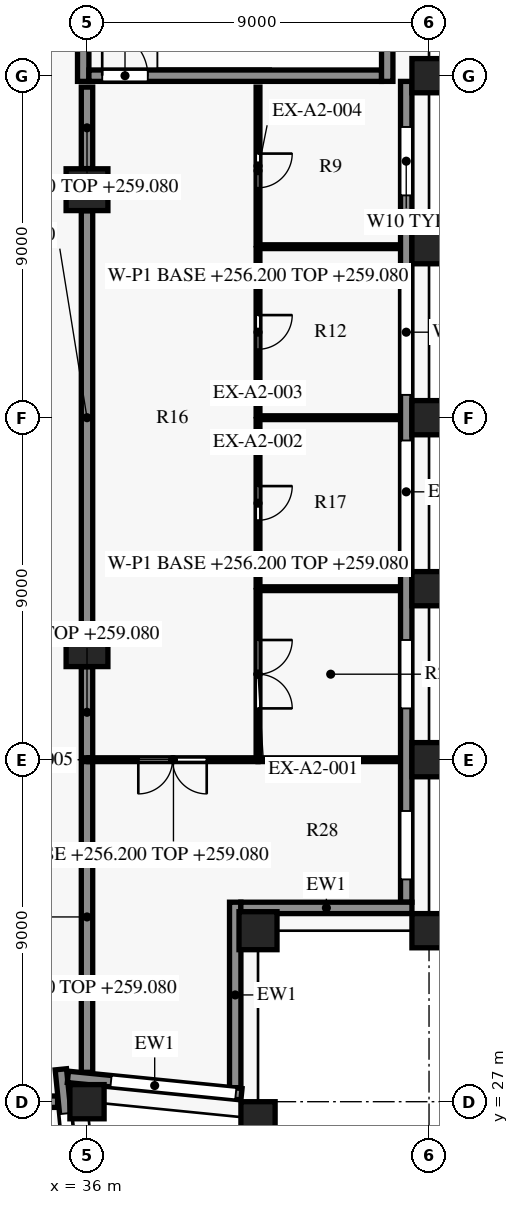
"""IFC4 building model, lengths in metres.
Left out: names, types, materials, properties, quantities, classifications, styles, units other than length and angle.
Written with IfcOpenShell. Run it as: python <this file> out.ifc"""

import sys

from ifc_helpers import new_model, si_unit, direction, frame, frame_2d, origin, origin_2d, place, context, subcontext, project, spatial, rectangle, extrude, element, fill, save


model = new_model("IFC4")
c1 = context("Model", 3, precision=1e-05, world=origin(), true_north=direction((0.0, 1.0)))
c2 = subcontext(c1, "Body", "Model", "MODEL_VIEW")
j1 = project(units=[si_unit("LENGTHUNIT", "METRE"), si_unit("PLANEANGLEUNIT", "RADIAN")], contexts=[c1])
p1 = place(None, origin())
s1 = spatial("IfcSite", under=j1, at=p1, CompositionType="ELEMENT")
p2 = place(p1, origin())
s2 = spatial("IfcBuilding", under=s1, at=p2, CompositionType="ELEMENT")
p3 = place(p2, frame((0.0, 0.0, 256.2)))
s3 = spatial("IfcBuildingStorey", under=s2, at=p3, CompositionType="ELEMENT", Elevation=256.2)
for number, where, z_axis, x_axis in (
    (1, (36.0, 27.0, 0.0), (0.0, 0.0, 1.0), (-0.1, 0.995, 0.0)),
    (2, (40.5, 26.55, 0.0), (0.0, 0.0, 1.0), (0.995, -0.1, 0.0)),
    (3, (45.0, 31.5, 0.0), (0.0, 0.0, 1.0), (0.0, 1.0, 0.0)),
    (4, (45.0, 36.0, 0.0), (0.0, 0.0, 1.0), (0.0, 1.0, 0.0)),
    (5, (45.0, 40.5, 0.0), (0.0, 0.0, 1.0), (0.0, 1.0, 0.0)),
    (6, (45.0, 45.0, 0.0), (0.0, 0.0, 1.0), (0.0, 1.0, 0.0)),
    (7, (45.0, 49.5, 0.0), (0.0, 0.0, 1.0), (0.0, 1.0, 0.0)),
    (8, (45.0, 54.0, 0.0), (0.0, 0.0, 1.0), (0.0, 1.0, 0.0)),
):
    element("IfcColumn", number, at=place(p3, frame(where, z_axis=z_axis, x_axis=x_axis)), inside=s3, PredefinedType="COLUMN", context=c2, shape_type="SweptSolid", body=[
        extrude(rectangle(XDim=0.9, YDim=0.9, at=origin_2d()), origin(), (0.0, 0.0, 1.0), 3.8),
    ])
p4 = place(p3, frame((40.5, 31.5, 0.0), z_axis=(0.0, 0.0, 1.0), x_axis=(1.0, 0.0, 0.0)))
e9 = element("IfcColumn", 9, at=p4, inside=s3, PredefinedType="COLUMN", context=c2, shape_type="SweptSolid", body=[
    extrude(rectangle(XDim=1.0, YDim=1.0, at=origin_2d()), origin(), (0.0, 0.0, 1.0), 3.8),
])
for number, where, z_axis, x_axis in (
    (10, (36.0, 39.0, 0.0), (0.0, 0.0, 1.0), (1.0, 0.0, 0.0)),
    (11, (36.0, 51.0, 0.0), (0.0, 0.0, 1.0), (1.0, 0.0, 0.0)),
):
    element("IfcColumn", number, at=place(p3, frame(where, z_axis=z_axis, x_axis=x_axis)), inside=s3, PredefinedType="COLUMN", context=c2, shape_type="SweptSolid", body=[
        extrude(rectangle(XDim=1.1, YDim=1.1, at=origin_2d()), origin(), (0.0, 0.0, 1.0), 3.8),
    ])
p5 = place(p3, frame((35.312, 27.852, 0.0), z_axis=(0.0, 0.0, 1.0), x_axis=(0.099503719021, -0.99503719021, 0.0)))
e12 = element("IfcWall", 12, at=p5, inside=s3, PredefinedType="SOLIDWALL", context=c2, shape_type="SweptSolid", body=[
    extrude(rectangle(XDim=4.62, YDim=0.3, at=frame_2d((2.31, 0.0))), origin(), (0.0, 0.0, 1.0), 3.15),
])
p6 = place(p5, frame((1.17, 0.0, 0.15)))
e13 = element("IfcOpeningElement", 13, at=p6, cuts=e12, PredefinedType="OPENING", context=c2, shape_type="SweptSolid", body=[
    extrude(rectangle(XDim=3.3, YDim=2.4, at=frame_2d((1.65, 1.2))), frame((0.0, 0.16, 0.0), z_axis=(0.0, -1.0, 0.0), x_axis=(1.0, 0.0, 0.0)), (0.0, 0.0, 1.0), 0.32),
])
p7 = place(p3, frame((40.065, 27.197, 0.0), z_axis=(0.0, 0.0, 1.0), x_axis=(-0.995036663613, 0.099508984853, 0.0)))
e14 = element("IfcWall", 14, at=p7, inside=s3, PredefinedType="SOLIDWALL", context=c2, shape_type="SweptSolid", body=[
    extrude(rectangle(XDim=4.59, YDim=0.3, at=frame_2d((2.295, 0.0))), origin(), (0.0, 0.0, 1.0), 3.15),
])
p8 = place(p7, frame((0.15, 0.0, 0.15)))
e15 = element("IfcOpeningElement", 15, at=p8, cuts=e14, PredefinedType="OPENING", context=c2, shape_type="SweptSolid", body=[
    extrude(rectangle(XDim=3.3, YDim=2.4, at=frame_2d((1.65, 1.2))), frame((0.0, 0.16, 0.0), z_axis=(0.0, -1.0, 0.0), x_axis=(1.0, 0.0, 0.0)), (0.0, 0.0, 1.0), 0.32),
])
p9 = place(p3, frame((39.9, 32.25, 0.0), z_axis=(0.0, 0.0, 1.0), x_axis=(0.0, -1.0, 0.0)))
e16 = element("IfcWall", 16, at=p9, inside=s3, PredefinedType="SOLIDWALL", context=c2, shape_type="SweptSolid", body=[
    extrude(rectangle(XDim=4.881, YDim=0.3, at=frame_2d((2.44, 0.0))), origin(), (0.0, 0.0, 1.0), 3.15),
])
p10 = place(p3, frame((44.55, 32.1, 0.0), z_axis=(0.0, 0.0, 1.0), x_axis=(-1.0, 0.0, 0.0)))
e17 = element("IfcWall", 17, at=p10, inside=s3, PredefinedType="SOLIDWALL", context=c2, shape_type="SweptSolid", body=[
    extrude(rectangle(XDim=4.502, YDim=0.3, at=frame_2d((2.251, 0.0))), origin(), (0.0, 0.0, 1.0), 3.15),
])
p11 = place(p3, frame((44.4, 53.85, 0.0), z_axis=(0.0, 0.0, 1.0), x_axis=(0.0, -1.0, 0.0)))
e18 = element("IfcWall", 18, at=p11, inside=s3, PredefinedType="SOLIDWALL", context=c2, shape_type="SweptSolid", body=[
    extrude(rectangle(XDim=21.602, YDim=0.3, at=frame_2d((10.801, 0.0))), origin(), (0.0, 0.0, 1.0), 3.15),
])
p12 = place(p11, frame((1.2, 0.0, 0.75)))
e19 = element("IfcOpeningElement", 19, at=p12, cuts=e18, PredefinedType="OPENING", context=c2, shape_type="SweptSolid", body=[
    extrude(rectangle(XDim=1.8, YDim=1.8, at=frame_2d((0.9, 0.9))), frame((0.0, 0.16, 0.0), z_axis=(0.0, -1.0, 0.0), x_axis=(1.0, 0.0, 0.0)), (0.0, 0.0, 1.0), 0.32),
])
p13 = place(p11, frame((4.95, 0.0, 0.15)))
e20 = element("IfcOpeningElement", 20, at=p13, cuts=e18, PredefinedType="OPENING", context=c2, shape_type="SweptSolid", body=[
    extrude(rectangle(XDim=3.3, YDim=2.4, at=frame_2d((1.65, 1.2))), frame((0.0, 0.16, 0.0), z_axis=(0.0, -1.0, 0.0), x_axis=(1.0, 0.0, 0.0)), (0.0, 0.0, 1.0), 0.32),
])
p14 = place(p11, frame((9.45, 0.0, 0.15)))
e21 = element("IfcOpeningElement", 21, at=p14, cuts=e18, PredefinedType="OPENING", context=c2, shape_type="SweptSolid", body=[
    extrude(rectangle(XDim=3.3, YDim=2.4, at=frame_2d((1.65, 1.2))), frame((0.0, 0.16, 0.0), z_axis=(0.0, -1.0, 0.0), x_axis=(1.0, 0.0, 0.0)), (0.0, 0.0, 1.0), 0.32),
])
p15 = place(p11, frame((14.7, 0.0, 0.75)))
e22 = element("IfcOpeningElement", 22, at=p15, cuts=e18, PredefinedType="OPENING", context=c2, shape_type="SweptSolid", body=[
    extrude(rectangle(XDim=1.8, YDim=1.8, at=frame_2d((0.9, 0.9))), frame((0.0, 0.16, 0.0), z_axis=(0.0, -1.0, 0.0), x_axis=(1.0, 0.0, 0.0)), (0.0, 0.0, 1.0), 0.32),
])
p16 = place(p11, frame((19.2, 0.0, 0.75)))
e23 = element("IfcOpeningElement", 23, at=p16, cuts=e18, PredefinedType="OPENING", context=c2, shape_type="SweptSolid", body=[
    extrude(rectangle(XDim=1.8, YDim=1.8, at=frame_2d((0.9, 0.9))), frame((0.0, 0.16, 0.0), z_axis=(0.0, -1.0, 0.0), x_axis=(1.0, 0.0, 0.0)), (0.0, 0.0, 1.0), 0.32),
])
p17 = place(p3, frame((36.05, 54.0, 0.0), z_axis=(0.0, 0.0, 1.0), x_axis=(1.0, 0.0, 0.0)))
e24 = element("IfcWall", 24, at=p17, inside=s3, PredefinedType="SHEAR", context=c2, shape_type="SweptSolid", body=[
    extrude(rectangle(XDim=7.7, YDim=0.3, at=frame_2d((3.85, 0.0))), origin(), (0.0, 0.0, 1.0), 3.5),
])
p18 = place(p17, frame((0.35, 0.0, 0.0)))
e25 = element("IfcOpeningElement", 25, at=p18, cuts=e24, PredefinedType="OPENING", context=c2, shape_type="SweptSolid", body=[
    extrude(rectangle(XDim=1.2, YDim=2.2, at=frame_2d((0.6, 1.1))), frame((0.0, 0.16, 0.0), z_axis=(0.0, -1.0, 0.0), x_axis=(1.0, 0.0, 0.0)), (0.0, 0.0, 1.0), 0.32),
])
for number, where, z_axis, x_axis in (
    (26, (35.9, 53.85, 0.0), (0.0, 0.0, 1.0), (0.0, 1.0, 0.0)),
    (27, (43.9, 53.85, 0.0), (0.0, 0.0, 1.0), (0.0, 1.0, 0.0)),
):
    element("IfcWall", number, at=place(p3, frame(where, z_axis=z_axis, x_axis=x_axis)), inside=s3, PredefinedType="SHEAR", context=c2, shape_type="SweptSolid", body=[
        extrude(rectangle(XDim=3.9, YDim=0.3, at=frame_2d((1.95, 0.0))), origin(), (0.0, 0.0, 1.0), 3.5),
    ])
p19 = place(p3, frame((27.0, 27.0, 0.0), z_axis=(0.0, 0.0, 1.0), x_axis=(1.0, 0.0, 0.0)))
e28 = element("IfcWall", 28, at=p19, inside=s3, PredefinedType="PARTITIONING", context=c2, shape_type="SweptSolid", body=[
    extrude(rectangle(XDim=8.226, YDim=0.3, at=frame_2d((4.113, 0.0))), origin(), (0.0, 0.0, 1.0), 2.88),
])
p20 = place(p3, frame((36.0, 27.774, 0.0), z_axis=(0.0, 0.0, 1.0), x_axis=(0.0, 1.0, 0.0)))
e29 = element("IfcWall", 29, at=p20, inside=s3, PredefinedType="PARTITIONING", context=c2, shape_type="SweptSolid", body=[
    extrude(rectangle(XDim=8.176, YDim=0.3, at=frame_2d((4.088, 0.0))), origin(), (0.0, 0.0, 1.0), 2.88),
])
p21 = place(p3, frame((40.5, 36.0, 0.0), z_axis=(0.0, 0.0, 1.0), x_axis=(-1.0, 0.0, 0.0)))
e30 = element("IfcWall", 30, at=p21, inside=s3, PredefinedType="PARTITIONING", context=c2, shape_type="SweptSolid", body=[
    extrude(rectangle(XDim=4.45, YDim=0.1, at=frame_2d((2.225, 0.0))), origin(), (0.0, 0.0, 1.0), 2.88),
])
p22 = place(p21, frame((1.35, 0.0, 0.0)))
e31 = element("IfcOpeningElement", 31, at=p22, cuts=e30, PredefinedType="OPENING", context=c2, shape_type="SweptSolid", body=[
    extrude(rectangle(XDim=1.8, YDim=2.1, at=frame_2d((0.9, 1.05))), frame((0.0, 0.06, 0.0), z_axis=(0.0, -1.0, 0.0), x_axis=(1.0, 0.0, 0.0)), (0.0, 0.0, 1.0), 0.12),
])
p23 = place(p3, frame((44.23, 36.0, 0.0), z_axis=(0.0, 0.0, 1.0), x_axis=(-1.0, 0.0, 0.0)))
e32 = element("IfcWall", 32, at=p23, inside=s3, PredefinedType="PARTITIONING", context=c2, shape_type="SweptSolid", body=[
    extrude(rectangle(XDim=3.73, YDim=0.1, at=frame_2d((1.865, 0.0))), origin(), (0.0, 0.0, 1.0), 3.48),
])
p24 = place(p3, frame((36.0, 36.05, 0.0), z_axis=(0.0, 0.0, 1.0), x_axis=(0.0, 1.0, 0.0)))
e33 = element("IfcWall", 33, at=p24, inside=s3, PredefinedType="PARTITIONING", context=c2, shape_type="SweptSolid", body=[
    extrude(rectangle(XDim=2.395, YDim=0.3, at=frame_2d((1.198, 0.0))), origin(), (0.0, 0.0, 1.0), 2.88),
])
p25 = place(p3, frame((36.0, 39.555, 0.0), z_axis=(0.0, 0.0, 1.0), x_axis=(0.0, 1.0, 0.0)))
e34 = element("IfcWall", 34, at=p25, inside=s3, PredefinedType="PARTITIONING", context=c2, shape_type="SweptSolid", body=[
    extrude(rectangle(XDim=10.89, YDim=0.3, at=frame_2d((5.445, 0.0))), origin(), (0.0, 0.0, 1.0), 2.88),
])
p26 = place(p3, frame((40.5, 40.45, 0.0), z_axis=(0.0, 0.0, 1.0), x_axis=(0.0, -1.0, 0.0)))
e35 = element("IfcWall", 35, at=p26, inside=s3, PredefinedType="PARTITIONING", context=c2, shape_type="SweptSolid", body=[
    extrude(rectangle(XDim=4.4, YDim=0.1, at=frame_2d((2.2, 0.0))), origin(), (0.0, 0.0, 1.0), 2.88),
])
p27 = place(p26, frame((1.3, 0.0, 0.0)))
e36 = element("IfcOpeningElement", 36, at=p27, cuts=e35, PredefinedType="OPENING", context=c2, shape_type="SweptSolid", body=[
    extrude(rectangle(XDim=1.8, YDim=2.1, at=frame_2d((0.9, 1.05))), frame((0.0, 0.06, 0.0), z_axis=(0.0, -1.0, 0.0), x_axis=(1.0, 0.0, 0.0)), (0.0, 0.0, 1.0), 0.12),
])
p28 = place(p3, frame((40.55, 40.5, 0.0), z_axis=(0.0, 0.0, 1.0), x_axis=(1.0, 0.0, 0.0)))
e37 = element("IfcWall", 37, at=p28, inside=s3, PredefinedType="PARTITIONING", context=c2, shape_type="SweptSolid", body=[
    extrude(rectangle(XDim=3.68, YDim=0.1, at=frame_2d((1.84, 0.0))), origin(), (0.0, 0.0, 1.0), 3.48),
])
p29 = place(p3, frame((40.5, 44.95, 0.0), z_axis=(0.0, 0.0, 1.0), x_axis=(0.0, -1.0, 0.0)))
e38 = element("IfcWall", 38, at=p29, inside=s3, PredefinedType="PARTITIONING", context=c2, shape_type="SweptSolid", body=[
    extrude(rectangle(XDim=4.4, YDim=0.1, at=frame_2d((2.2, 0.0))), origin(), (0.0, 0.0, 1.0), 3.48),
])
p30 = place(p29, frame((1.75, 0.0, 0.0)))
e39 = element("IfcOpeningElement", 39, at=p30, cuts=e38, PredefinedType="OPENING", context=c2, shape_type="SweptSolid", body=[
    extrude(rectangle(XDim=0.9, YDim=2.1, at=frame_2d((0.45, 1.05))), frame((0.0, 0.06, 0.0), z_axis=(0.0, -1.0, 0.0), x_axis=(1.0, 0.0, 0.0)), (0.0, 0.0, 1.0), 0.12),
])
p31 = place(p3, frame((40.55, 45.0, 0.0), z_axis=(0.0, 0.0, 1.0), x_axis=(1.0, 0.0, 0.0)))
e40 = element("IfcWall", 40, at=p31, inside=s3, PredefinedType="PARTITIONING", context=c2, shape_type="SweptSolid", body=[
    extrude(rectangle(XDim=3.68, YDim=0.1, at=frame_2d((1.84, 0.0))), origin(), (0.0, 0.0, 1.0), 3.48),
])
p32 = place(p3, frame((40.5, 49.45, 0.0), z_axis=(0.0, 0.0, 1.0), x_axis=(0.0, -1.0, 0.0)))
e41 = element("IfcWall", 41, at=p32, inside=s3, PredefinedType="PARTITIONING", context=c2, shape_type="SweptSolid", body=[
    extrude(rectangle(XDim=4.4, YDim=0.1, at=frame_2d((2.2, 0.0))), origin(), (0.0, 0.0, 1.0), 3.48),
])
p33 = place(p32, frame((1.75, 0.0, 0.0)))
e42 = element("IfcOpeningElement", 42, at=p33, cuts=e41, PredefinedType="OPENING", context=c2, shape_type="SweptSolid", body=[
    extrude(rectangle(XDim=0.9, YDim=2.1, at=frame_2d((0.45, 1.05))), frame((0.0, 0.06, 0.0), z_axis=(0.0, -1.0, 0.0), x_axis=(1.0, 0.0, 0.0)), (0.0, 0.0, 1.0), 0.12),
])
p34 = place(p3, frame((40.55, 49.5, 0.0), z_axis=(0.0, 0.0, 1.0), x_axis=(1.0, 0.0, 0.0)))
e43 = element("IfcWall", 43, at=p34, inside=s3, PredefinedType="PARTITIONING", context=c2, shape_type="SweptSolid", body=[
    extrude(rectangle(XDim=3.68, YDim=0.1, at=frame_2d((1.84, 0.0))), origin(), (0.0, 0.0, 1.0), 3.48),
])
p35 = place(p3, frame((36.0, 51.555, 0.0), z_axis=(0.0, 0.0, 1.0), x_axis=(0.0, 1.0, 0.0)))
e44 = element("IfcWall", 44, at=p35, inside=s3, PredefinedType="PARTITIONING", context=c2, shape_type="SweptSolid", body=[
    extrude(rectangle(XDim=2.145, YDim=0.3, at=frame_2d((1.073, 0.0))), origin(), (0.0, 0.0, 1.0), 2.88),
])
p36 = place(p3, frame((40.5, 53.7, 0.0), z_axis=(0.0, 0.0, 1.0), x_axis=(0.0, -1.0, 0.0)))
e45 = element("IfcWall", 45, at=p36, inside=s3, PredefinedType="PARTITIONING", context=c2, shape_type="SweptSolid", body=[
    extrude(rectangle(XDim=4.15, YDim=0.1, at=frame_2d((2.075, 0.0))), origin(), (0.0, 0.0, 1.0), 2.88),
])
p37 = place(p36, frame((1.75, 0.0, 0.0)))
e46 = element("IfcOpeningElement", 46, at=p37, cuts=e45, PredefinedType="OPENING", context=c2, shape_type="SweptSolid", body=[
    extrude(rectangle(XDim=0.9, YDim=2.1, at=frame_2d((0.45, 1.05))), frame((0.0, 0.06, 0.0), z_axis=(0.0, -1.0, 0.0), x_axis=(1.0, 0.0, 0.0)), (0.0, 0.0, 1.0), 0.12),
])
p38 = place(p6, origin())
e47 = element("IfcWindow", 47, at=p38, inside=s3, PartitioningType="SINGLE_PANEL", PredefinedType="WINDOW", context=c2, shape_type="SweptSolid", body=[
    extrude(rectangle(XDim=3.3, YDim=2.4, at=frame_2d((1.65, 1.2))), frame((0.0, 0.03, 0.0), z_axis=(0.0, -1.0, 0.0), x_axis=(1.0, 0.0, 0.0)), (0.0, 0.0, 1.0), 0.06),
])
fill(e13, e47)
p39 = place(p8, origin())
e48 = element("IfcWindow", 48, at=p39, inside=s3, PartitioningType="SINGLE_PANEL", PredefinedType="WINDOW", context=c2, shape_type="SweptSolid", body=[
    extrude(rectangle(XDim=3.3, YDim=2.4, at=frame_2d((1.65, 1.2))), frame((0.0, 0.03, 0.0), z_axis=(0.0, -1.0, 0.0), x_axis=(1.0, 0.0, 0.0)), (0.0, 0.0, 1.0), 0.06),
])
fill(e15, e48)
p40 = place(p12, origin())
e49 = element("IfcWindow", 49, at=p40, inside=s3, PartitioningType="SINGLE_PANEL", PredefinedType="WINDOW", context=c2, shape_type="SweptSolid", body=[
    extrude(rectangle(XDim=1.8, YDim=1.8, at=frame_2d((0.9, 0.9))), frame((0.0, 0.03, 0.0), z_axis=(0.0, -1.0, 0.0), x_axis=(1.0, 0.0, 0.0)), (0.0, 0.0, 1.0), 0.06),
])
fill(e19, e49)
p41 = place(p13, origin())
e50 = element("IfcWindow", 50, at=p41, inside=s3, PartitioningType="SINGLE_PANEL", PredefinedType="WINDOW", context=c2, shape_type="SweptSolid", body=[
    extrude(rectangle(XDim=3.3, YDim=2.4, at=frame_2d((1.65, 1.2))), frame((0.0, 0.03, 0.0), z_axis=(0.0, -1.0, 0.0), x_axis=(1.0, 0.0, 0.0)), (0.0, 0.0, 1.0), 0.06),
])
fill(e20, e50)
p42 = place(p14, origin())
e51 = element("IfcWindow", 51, at=p42, inside=s3, PartitioningType="SINGLE_PANEL", PredefinedType="WINDOW", context=c2, shape_type="SweptSolid", body=[
    extrude(rectangle(XDim=3.3, YDim=2.4, at=frame_2d((1.65, 1.2))), frame((0.0, 0.03, 0.0), z_axis=(0.0, -1.0, 0.0), x_axis=(1.0, 0.0, 0.0)), (0.0, 0.0, 1.0), 0.06),
])
fill(e21, e51)
p43 = place(p15, origin())
e52 = element("IfcWindow", 52, at=p43, inside=s3, PartitioningType="SINGLE_PANEL", PredefinedType="WINDOW", context=c2, shape_type="SweptSolid", body=[
    extrude(rectangle(XDim=1.8, YDim=1.8, at=frame_2d((0.9, 0.9))), frame((0.0, 0.03, 0.0), z_axis=(0.0, -1.0, 0.0), x_axis=(1.0, 0.0, 0.0)), (0.0, 0.0, 1.0), 0.06),
])
fill(e22, e52)
p44 = place(p16, origin())
e53 = element("IfcWindow", 53, at=p44, inside=s3, PartitioningType="SINGLE_PANEL", PredefinedType="WINDOW", context=c2, shape_type="SweptSolid", body=[
    extrude(rectangle(XDim=1.8, YDim=1.8, at=frame_2d((0.9, 0.9))), frame((0.0, 0.03, 0.0), z_axis=(0.0, -1.0, 0.0), x_axis=(1.0, 0.0, 0.0)), (0.0, 0.0, 1.0), 0.06),
])
fill(e23, e53)
p45 = place(p18, origin())
e54 = element("IfcDoor", 54, at=p45, inside=s3, OperationType="SINGLE_SWING_LEFT", PredefinedType="DOOR", context=c2, shape_type="SweptSolid", body=[
    extrude(rectangle(XDim=1.2, YDim=2.2, at=frame_2d((0.6, 1.1))), frame((0.0, 0.025, 0.0), z_axis=(0.0, -1.0, 0.0), x_axis=(1.0, 0.0, 0.0)), (0.0, 0.0, 1.0), 0.05),
])
fill(e25, e54)
p46 = place(p27, origin())
e55 = element("IfcDoor", 55, at=p46, inside=s3, OperationType="DOUBLE_DOOR_SINGLE_SWING", PredefinedType="DOOR", context=c2, shape_type="SweptSolid", body=[
    extrude(rectangle(XDim=1.8, YDim=2.1, at=frame_2d((0.9, 1.05))), frame((0.0, 0.025, 0.0), z_axis=(0.0, -1.0, 0.0), x_axis=(1.0, 0.0, 0.0)), (0.0, 0.0, 1.0), 0.05),
])
fill(e36, e55)
p47 = place(p30, origin())
e56 = element("IfcDoor", 56, at=p47, inside=s3, OperationType="SINGLE_SWING_LEFT", PredefinedType="DOOR", context=c2, shape_type="SweptSolid", body=[
    extrude(rectangle(XDim=0.9, YDim=2.1, at=frame_2d((0.45, 1.05))), frame((0.0, 0.025, 0.0), z_axis=(0.0, -1.0, 0.0), x_axis=(1.0, 0.0, 0.0)), (0.0, 0.0, 1.0), 0.05),
])
fill(e39, e56)
p48 = place(p33, origin())
e57 = element("IfcDoor", 57, at=p48, inside=s3, OperationType="SINGLE_SWING_LEFT", PredefinedType="DOOR", context=c2, shape_type="SweptSolid", body=[
    extrude(rectangle(XDim=0.9, YDim=2.1, at=frame_2d((0.45, 1.05))), frame((0.0, 0.025, 0.0), z_axis=(0.0, -1.0, 0.0), x_axis=(1.0, 0.0, 0.0)), (0.0, 0.0, 1.0), 0.05),
])
fill(e42, e57)
p49 = place(p37, origin())
e58 = element("IfcDoor", 58, at=p49, inside=s3, OperationType="SINGLE_SWING_LEFT", PredefinedType="DOOR", context=c2, shape_type="SweptSolid", body=[
    extrude(rectangle(XDim=0.9, YDim=2.1, at=frame_2d((0.45, 1.05))), frame((0.0, 0.025, 0.0), z_axis=(0.0, -1.0, 0.0), x_axis=(1.0, 0.0, 0.0)), (0.0, 0.0, 1.0), 0.05),
])
fill(e46, e58)
p50 = place(p22, origin())
e59 = element("IfcDoor", 59, at=p50, inside=s3, OperationType="DOUBLE_DOOR_SINGLE_SWING", PredefinedType="DOOR", context=c2, shape_type="SweptSolid", body=[
    extrude(rectangle(XDim=1.8, YDim=2.1, at=frame_2d((0.9, 1.05))), frame((0.0, 0.025, 0.0), z_axis=(0.0, -1.0, 0.0), x_axis=(1.0, 0.0, 0.0)), (0.0, 0.0, 1.0), 0.05),
])
fill(e31, e59)
save(model, sys.argv[1])
